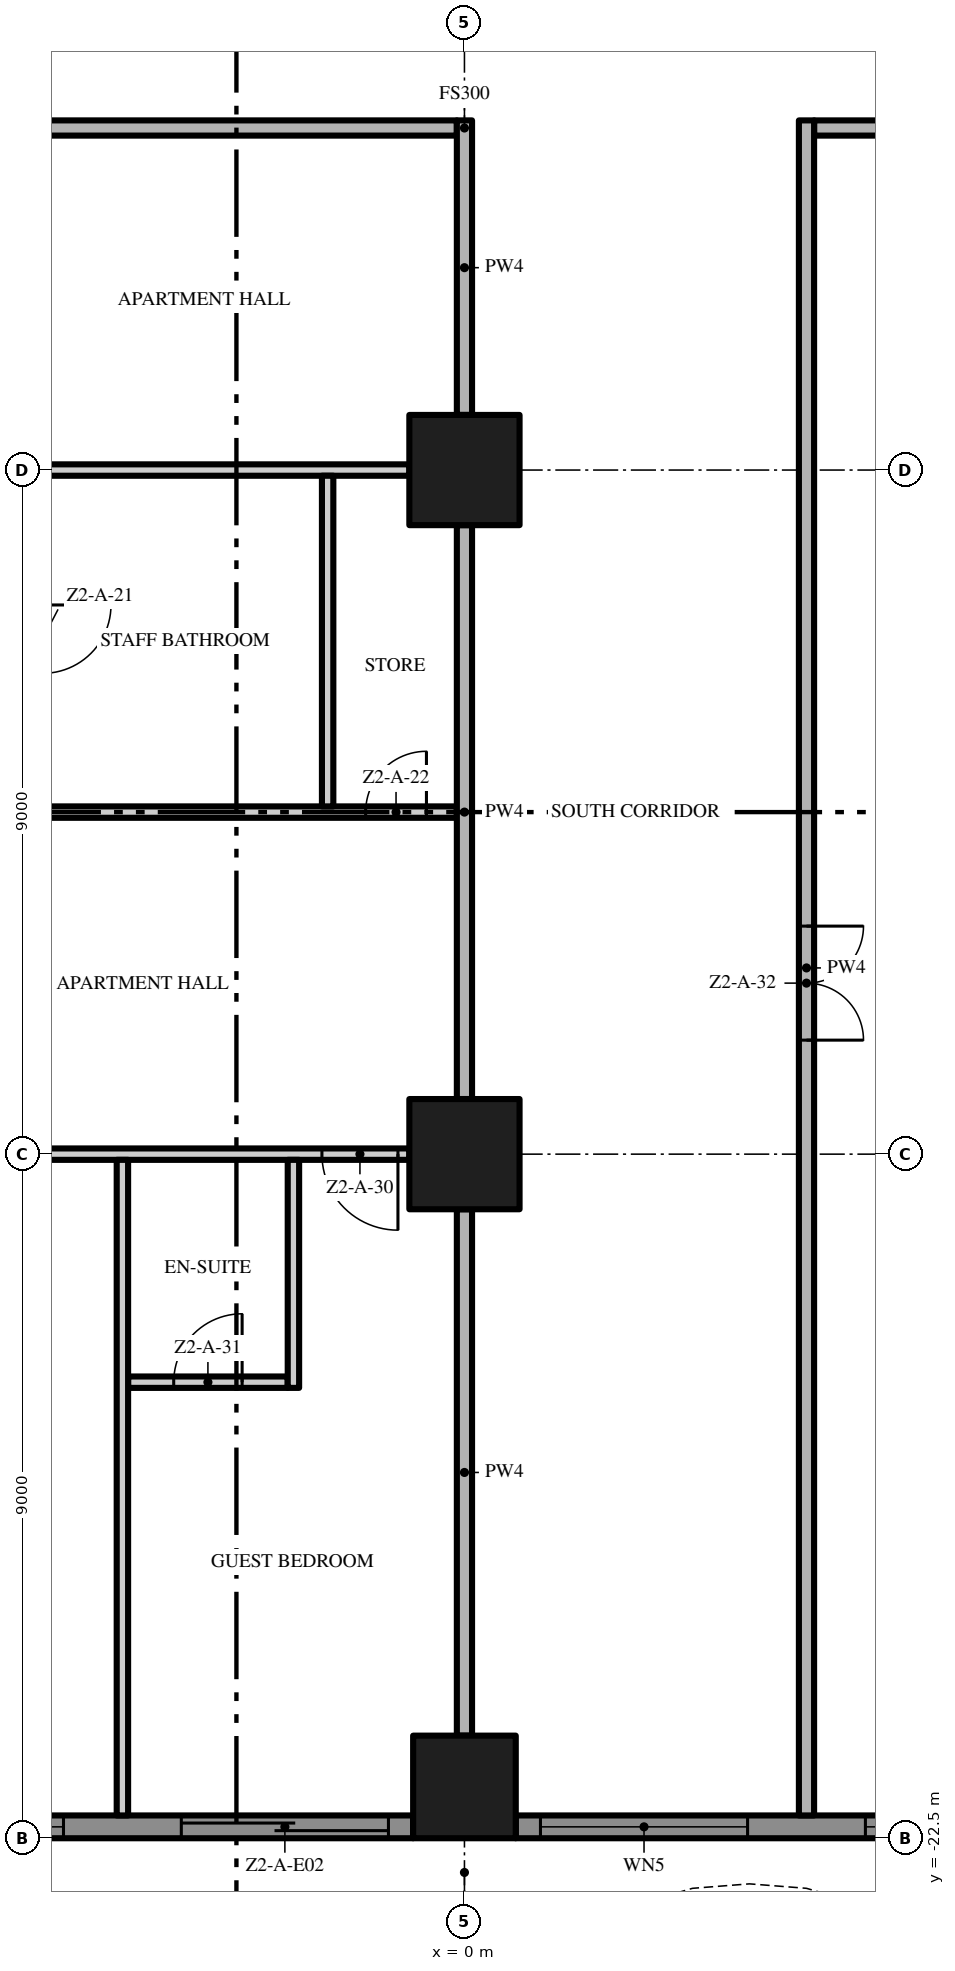
"""IFC4 building model, lengths in metres.
Left out: names, types, materials, properties, quantities, classifications, styles, units other than length and angle.
Written with IfcOpenShell. Run it as: python <this file> out.ifc"""

import sys

from ifc_helpers import new_model, si_unit, direction, frame, frame_2d, origin, origin_2d, place, context, subcontext, project, spatial, polyline, rectangle, outline, extrude, element, fill, save


model = new_model("IFC4")
c1 = context("Model", 3, precision=1e-05, world=origin(), true_north=direction((0.0, 1.0)))
c2 = subcontext(c1, "Body", "Model", "MODEL_VIEW")
j1 = project(units=[si_unit("LENGTHUNIT", "METRE"), si_unit("PLANEANGLEUNIT", "RADIAN")], contexts=[c1])
p1 = place(None, origin())
s1 = spatial("IfcSite", under=j1, at=p1, CompositionType="ELEMENT")
p2 = place(p1, origin())
s2 = spatial("IfcBuilding", under=s1, at=p2, CompositionType="ELEMENT")
p3 = place(p2, frame((0.0, 0.0, 77.0)))
s3 = spatial("IfcBuildingStorey", under=s2, at=p3, CompositionType="ELEMENT", Elevation=77.0)
p4 = place(p3, frame((0.0, -13.5, 0.0), z_axis=(0.0, 0.0, 1.0), x_axis=(1.0, 0.0, 0.0)))
e1 = element("IfcColumn", 1, at=p4, inside=s3, PredefinedType="COLUMN", context=c2, shape_type="SweptSolid", body=[
    extrude(rectangle(XDim=1.45, YDim=1.45, at=origin_2d()), origin(), (0.0, 0.0, 1.0), 3.5),
])
p5 = place(p3, frame((0.0, -21.825, 0.0), z_axis=(0.0, 0.0, 1.0), x_axis=(1.0, 0.0, 0.0)))
e2 = element("IfcColumn", 2, at=p5, inside=s3, PredefinedType="COLUMN", context=c2, shape_type="SweptSolid", body=[
    extrude(rectangle(XDim=1.35, YDim=1.35, at=origin_2d()), origin(), (0.0, 0.0, 1.0), 3.5),
])
p6 = place(p3, frame((0.0, -4.5, 0.0), z_axis=(0.0, 0.0, 1.0), x_axis=(1.0, 0.0, 0.0)))
e3 = element("IfcColumn", 3, at=p6, inside=s3, PredefinedType="COLUMN", context=c2, shape_type="SweptSolid", body=[
    extrude(rectangle(XDim=1.45, YDim=1.45, at=origin_2d()), origin(), (0.0, 0.0, 1.0), 3.5),
])
p7 = place(p3, frame((-0.675, -22.35, 0.0), z_axis=(0.0, 0.0, 1.0), x_axis=(-1.0, 0.0, 0.0)))
e4 = element("IfcWall", 4, at=p7, inside=s3, PredefinedType="SOLIDWALL", context=c2, shape_type="SweptSolid", body=[
    extrude(rectangle(XDim=7.65, YDim=0.3, at=frame_2d((3.825, 0.0))), origin(), (0.0, 0.0, 1.0), 3.5),
])
p8 = place(p7, frame((4.6, 0.0, 0.45)))
e5 = element("IfcOpeningElement", 5, at=p8, cuts=e4, PredefinedType="OPENING", context=c2, shape_type="SweptSolid", body=[
    extrude(rectangle(XDim=2.725, YDim=2.65, at=frame_2d((1.363, 1.325))), frame((0.0, 0.16, 0.0), z_axis=(0.0, -1.0, 0.0), x_axis=(1.0, 0.0, 0.0)), (0.0, 0.0, 1.0), 0.32),
])
p9 = place(p7, frame((0.325, 0.0, 0.0)))
e6 = element("IfcOpeningElement", 6, at=p9, cuts=e4, PredefinedType="OPENING", context=c2, shape_type="SweptSolid", body=[
    extrude(rectangle(XDim=2.725, YDim=2.4, at=frame_2d((1.363, 1.2))), frame((0.0, 0.16, 0.0), z_axis=(0.0, -1.0, 0.0), x_axis=(1.0, 0.0, 0.0)), (0.0, 0.0, 1.0), 0.32),
])
p10 = place(p3, frame((8.325, -22.35, 0.0), z_axis=(0.0, 0.0, 1.0), x_axis=(-1.0, 0.0, 0.0)))
e7 = element("IfcWall", 7, at=p10, inside=s3, PredefinedType="SOLIDWALL", context=c2, shape_type="SweptSolid", body=[
    extrude(rectangle(XDim=7.65, YDim=0.3, at=frame_2d((3.825, 0.0))), origin(), (0.0, 0.0, 1.0), 3.5),
])
p11 = place(p10, frame((4.6, 0.0, 0.45)))
e8 = element("IfcOpeningElement", 8, at=p11, cuts=e7, PredefinedType="OPENING", context=c2, shape_type="SweptSolid", body=[
    extrude(rectangle(XDim=2.725, YDim=2.65, at=frame_2d((1.363, 1.325))), frame((0.0, 0.16, 0.0), z_axis=(0.0, -1.0, 0.0), x_axis=(1.0, 0.0, 0.0)), (0.0, 0.0, 1.0), 0.32),
])
p12 = place(p10, frame((0.325, 0.0, 0.45)))
e9 = element("IfcOpeningElement", 9, at=p12, cuts=e7, PredefinedType="OPENING", context=c2, shape_type="SweptSolid", body=[
    extrude(rectangle(XDim=2.725, YDim=2.65, at=frame_2d((1.363, 1.325))), frame((0.0, 0.16, 0.0), z_axis=(0.0, -1.0, 0.0), x_axis=(1.0, 0.0, 0.0)), (0.0, 0.0, 1.0), 0.32),
])
p13 = place(p3, origin())
e10 = element("IfcWall", 10, at=p13, inside=s3, PredefinedType="USERDEFINED", context=c2, shape_type="SweptSolid", body=[
    extrude(outline(polyline([(-22.5, -24.3), (-21.0, -25.005), (-19.5, -25.441), (-18.75, -25.5), (-18.0, -25.441), (-16.5, -25.005), (-15.0, -24.3), (-13.5, -23.595), (-12.0, -23.159), (-11.25, -23.1), (-10.5, -23.159), (-9.0, -23.595), (-7.5, -24.3), (-6.0, -25.005), (-4.5, -25.441), (-3.75, -25.5), (-3.0, -25.441), (-1.5, -25.005), (0.0, -24.3), (1.5, -23.595), (3.0, -23.159), (3.75, -23.1), (4.5, -23.159), (6.0, -23.595), (7.5, -24.3), (9.0, -25.005), (10.5, -25.441), (11.25, -25.5), (12.0, -25.441), (13.5, -25.005), (15.0, -24.3), (16.5, -23.595), (18.0, -23.159), (18.75, -23.1), (19.5, -23.159), (21.0, -23.595), (22.5, -24.3), (22.606, -24.074), (21.089, -23.36), (19.545, -22.911), (18.75, -22.849), (17.955, -22.911), (16.411, -23.36), (14.894, -24.074), (13.411, -24.771), (11.955, -25.194), (11.25, -25.249), (10.545, -25.194), (9.089, -24.771), (7.606, -24.074), (6.089, -23.36), (4.545, -22.911), (3.75, -22.849), (2.955, -22.911), (1.411, -23.36), (-0.106, -24.074), (-1.589, -24.771), (-3.045, -25.194), (-3.75, -25.249), (-4.455, -25.194), (-5.911, -24.771), (-7.394, -24.074), (-8.911, -23.36), (-10.455, -22.911), (-11.25, -22.849), (-12.045, -22.911), (-13.589, -23.36), (-15.106, -24.074), (-16.589, -24.771), (-18.045, -25.194), (-18.75, -25.249), (-19.455, -25.194), (-20.911, -24.771), (-22.394, -24.074), (-22.5, -24.3)])), origin(), (0.0, 0.0, 1.0), 0.9),
])
p14 = place(p3, frame((-4.425, -16.5, 0.0), z_axis=(0.0, 0.0, 1.0), x_axis=(1.0, 0.0, 0.0)))
e11 = element("IfcWall", 11, at=p14, inside=s3, PredefinedType="PARTITIONING", context=c2, shape_type="SweptSolid", body=[
    extrude(rectangle(XDim=2.1, YDim=0.15, at=frame_2d((1.05, 0.0))), origin(), (0.0, 0.0, 1.0), 3.5),
])
p15 = place(p14, frame((0.6, 0.0, 0.0)))
e12 = element("IfcOpeningElement", 12, at=p15, cuts=e11, PredefinedType="OPENING", context=c2, shape_type="SweptSolid", body=[
    extrude(rectangle(XDim=0.9, YDim=2.1, at=frame_2d((0.45, 1.05))), frame((0.0, 0.085, 0.0), z_axis=(0.0, -1.0, 0.0), x_axis=(1.0, 0.0, 0.0)), (0.0, 0.0, 1.0), 0.17),
])
p16 = place(p3, frame((-0.725, -13.5, 0.0), z_axis=(0.0, 0.0, 1.0), x_axis=(-1.0, 0.0, 0.0)))
e13 = element("IfcWall", 13, at=p16, inside=s3, PredefinedType="PARTITIONING", context=c2, shape_type="SweptSolid", body=[
    extrude(rectangle(XDim=7.55, YDim=0.15, at=frame_2d((3.775, 0.0))), origin(), (0.0, 0.0, 1.0), 3.5),
])
p17 = place(p16, frame((5.3, 0.0, 0.0)))
e14 = element("IfcOpeningElement", 14, at=p17, cuts=e13, PredefinedType="OPENING", context=c2, shape_type="SweptSolid", body=[
    extrude(rectangle(XDim=1.5, YDim=2.4, at=frame_2d((0.75, 1.2))), frame((0.0, 0.085, 0.0), z_axis=(0.0, -1.0, 0.0), x_axis=(1.0, 0.0, 0.0)), (0.0, 0.0, 1.0), 0.17),
])
p18 = place(p16, frame((0.15, 0.0, 0.0)))
e15 = element("IfcOpeningElement", 15, at=p18, cuts=e13, PredefinedType="OPENING", context=c2, shape_type="SweptSolid", body=[
    extrude(rectangle(XDim=1.0, YDim=2.4, at=frame_2d((0.5, 1.2))), frame((0.0, 0.085, 0.0), z_axis=(0.0, -1.0, 0.0), x_axis=(1.0, 0.0, 0.0)), (0.0, 0.0, 1.0), 0.17),
])
p19 = place(p3, frame((-10.725, -9.0, 0.0), z_axis=(0.0, 0.0, 1.0), x_axis=(1.0, 0.0, 0.0)))
e16 = element("IfcWall", 16, at=p19, inside=s3, PredefinedType="PARTITIONING", context=c2, shape_type="SweptSolid", body=[
    extrude(rectangle(XDim=10.625, YDim=0.15, at=frame_2d((5.312, 0.0))), origin(), (0.0, 0.0, 1.0), 3.5),
])
p20 = place(p19, frame((2.1, 0.0, 0.0)))
e17 = element("IfcOpeningElement", 17, at=p20, cuts=e16, PredefinedType="OPENING", context=c2, shape_type="SweptSolid", body=[
    extrude(rectangle(XDim=0.9, YDim=2.1, at=frame_2d((0.45, 1.05))), frame((0.0, 0.085, 0.0), z_axis=(0.0, -1.0, 0.0), x_axis=(1.0, 0.0, 0.0)), (0.0, 0.0, 1.0), 0.17),
])
p21 = place(p19, frame((9.425, 0.0, 0.0)))
e18 = element("IfcOpeningElement", 18, at=p21, cuts=e16, PredefinedType="OPENING", context=c2, shape_type="SweptSolid", body=[
    extrude(rectangle(XDim=0.8, YDim=2.0, at=frame_2d((0.4, 1.0))), frame((0.0, 0.085, 0.0), z_axis=(0.0, -1.0, 0.0), x_axis=(1.0, 0.0, 0.0)), (0.0, 0.0, 1.0), 0.17),
])
p22 = place(p3, frame((-8.275, -4.5, 0.0), z_axis=(0.0, 0.0, 1.0), x_axis=(1.0, 0.0, 0.0)))
e19 = element("IfcWall", 19, at=p22, inside=s3, PredefinedType="PARTITIONING", context=c2, shape_type="SweptSolid", body=[
    extrude(rectangle(XDim=7.55, YDim=0.15, at=frame_2d((3.775, 0.0))), origin(), (0.0, 0.0, 1.0), 3.5),
])
p23 = place(p3, frame((-0.1, 0.0, 0.0), z_axis=(0.0, 0.0, 1.0), x_axis=(-1.0, 0.0, 0.0)))
e20 = element("IfcWall", 20, at=p23, inside=s3, PredefinedType="PARTITIONING", context=c2, shape_type="SweptSolid", body=[
    extrude(rectangle(XDim=17.3, YDim=0.2, at=frame_2d((8.65, 0.0))), origin(), (0.0, 0.0, 1.0), 3.5),
])
p24 = place(p23, frame((8.15, 0.0, 0.0)))
e21 = element("IfcOpeningElement", 21, at=p24, cuts=e20, PredefinedType="OPENING", context=c2, shape_type="SweptSolid", body=[
    extrude(rectangle(XDim=1.5, YDim=2.4, at=frame_2d((0.75, 1.2))), frame((0.0, 0.11, 0.0), z_axis=(0.0, -1.0, 0.0), x_axis=(1.0, 0.0, 0.0)), (0.0, 0.0, 1.0), 0.22),
])
p25 = place(p3, frame((4.6, 0.0, 0.0), z_axis=(0.0, 0.0, 1.0), x_axis=(1.0, 0.0, 0.0)))
e22 = element("IfcWall", 22, at=p25, inside=s3, PredefinedType="PARTITIONING", context=c2, shape_type="SweptSolid", body=[
    extrude(rectangle(XDim=12.8, YDim=0.2, at=frame_2d((6.4, 0.0))), origin(), (0.0, 0.0, 1.0), 3.5),
])
p26 = place(p3, frame((-4.5, -22.2, 0.0), z_axis=(0.0, 0.0, 1.0), x_axis=(0.0, 1.0, 0.0)))
e23 = element("IfcWall", 23, at=p26, inside=s3, PredefinedType="PARTITIONING", context=c2, shape_type="SweptSolid", body=[
    extrude(rectangle(XDim=8.625, YDim=0.15, at=frame_2d((4.312, 0.0))), origin(), (0.0, 0.0, 1.0), 3.5),
])
p27 = place(p3, frame((-2.25, -16.575, 0.0), z_axis=(0.0, 0.0, 1.0), x_axis=(0.0, 1.0, 0.0)))
e24 = element("IfcWall", 24, at=p27, inside=s3, PredefinedType="PARTITIONING", context=c2, shape_type="SweptSolid", body=[
    extrude(rectangle(XDim=3.0, YDim=0.15, at=frame_2d((1.5, 0.0))), origin(), (0.0, 0.0, 1.0), 3.5),
])
p28 = place(p3, frame((-1.8, -8.925, 0.0), z_axis=(0.0, 0.0, 1.0), x_axis=(0.0, 1.0, 0.0)))
e25 = element("IfcWall", 25, at=p28, inside=s3, PredefinedType="PARTITIONING", context=c2, shape_type="SweptSolid", body=[
    extrude(rectangle(XDim=4.35, YDim=0.15, at=frame_2d((2.175, 0.0))), origin(), (0.0, 0.0, 1.0), 3.5),
])
p29 = place(p3, frame((0.0, -21.15, 0.0), z_axis=(0.0, 0.0, 1.0), x_axis=(0.0, 1.0, 0.0)))
e26 = element("IfcWall", 26, at=p29, inside=s3, PredefinedType="PARTITIONING", context=c2, shape_type="SweptSolid", body=[
    extrude(rectangle(XDim=6.925, YDim=0.2, at=frame_2d((3.462, 0.0))), origin(), (0.0, 0.0, 1.0), 3.5),
])
p30 = place(p3, frame((0.0, -12.775, 0.0), z_axis=(0.0, 0.0, 1.0), x_axis=(0.0, 1.0, 0.0)))
e27 = element("IfcWall", 27, at=p30, inside=s3, PredefinedType="PARTITIONING", context=c2, shape_type="SweptSolid", body=[
    extrude(rectangle(XDim=7.55, YDim=0.2, at=frame_2d((3.775, 0.0))), origin(), (0.0, 0.0, 1.0), 3.5),
])
p31 = place(p3, frame((0.0, -3.775, 0.0), z_axis=(0.0, 0.0, 1.0), x_axis=(0.0, 1.0, 0.0)))
e28 = element("IfcWall", 28, at=p31, inside=s3, PredefinedType="PARTITIONING", context=c2, shape_type="SweptSolid", body=[
    extrude(rectangle(XDim=3.875, YDim=0.2, at=frame_2d((1.938, 0.0))), origin(), (0.0, 0.0, 1.0), 3.5),
])
p32 = place(p3, frame((4.5, 0.1, 0.0), z_axis=(0.0, 0.0, 1.0), x_axis=(0.0, -1.0, 0.0)))
e29 = element("IfcWall", 29, at=p32, inside=s3, PredefinedType="PARTITIONING", context=c2, shape_type="SweptSolid", body=[
    extrude(rectangle(XDim=22.3, YDim=0.2, at=frame_2d((11.15, 0.0))), origin(), (0.0, 0.0, 1.0), 3.5),
])
p33 = place(p32, frame((10.6, 0.0, 0.0)))
e30 = element("IfcOpeningElement", 30, at=p33, cuts=e29, PredefinedType="OPENING", context=c2, shape_type="SweptSolid", body=[
    extrude(rectangle(XDim=1.5, YDim=2.4, at=frame_2d((0.75, 1.2))), frame((0.0, 0.11, 0.0), z_axis=(0.0, -1.0, 0.0), x_axis=(1.0, 0.0, 0.0)), (0.0, 0.0, 1.0), 0.22),
])
p34 = place(p8, origin())
e31 = element("IfcWindow", 31, at=p34, inside=s3, PartitioningType="SINGLE_PANEL", PredefinedType="WINDOW", context=c2, shape_type="SweptSolid", body=[
    extrude(rectangle(XDim=2.725, YDim=2.65, at=frame_2d((1.363, 1.325))), frame((0.0, 0.03, 0.0), z_axis=(0.0, -1.0, 0.0), x_axis=(1.0, 0.0, 0.0)), (0.0, 0.0, 1.0), 0.06),
])
fill(e5, e31)
p35 = place(p9, origin())
e32 = element("IfcDoor", 32, at=p35, inside=s3, OperationType="SINGLE_SWING_LEFT", PredefinedType="DOOR", context=c2, shape_type="SweptSolid", body=[
    extrude(rectangle(XDim=2.725, YDim=2.4, at=frame_2d((1.363, 1.2))), frame((0.0, 0.025, 0.0), z_axis=(0.0, -1.0, 0.0), x_axis=(1.0, 0.0, 0.0)), (0.0, 0.0, 1.0), 0.05),
])
fill(e6, e32)
p36 = place(p11, origin())
e33 = element("IfcWindow", 33, at=p36, inside=s3, PartitioningType="SINGLE_PANEL", PredefinedType="WINDOW", context=c2, shape_type="SweptSolid", body=[
    extrude(rectangle(XDim=2.725, YDim=2.65, at=frame_2d((1.363, 1.325))), frame((0.0, 0.03, 0.0), z_axis=(0.0, -1.0, 0.0), x_axis=(1.0, 0.0, 0.0)), (0.0, 0.0, 1.0), 0.06),
])
fill(e8, e33)
p37 = place(p12, origin())
e34 = element("IfcWindow", 34, at=p37, inside=s3, PartitioningType="SINGLE_PANEL", PredefinedType="WINDOW", context=c2, shape_type="SweptSolid", body=[
    extrude(rectangle(XDim=2.725, YDim=2.65, at=frame_2d((1.363, 1.325))), frame((0.0, 0.03, 0.0), z_axis=(0.0, -1.0, 0.0), x_axis=(1.0, 0.0, 0.0)), (0.0, 0.0, 1.0), 0.06),
])
fill(e9, e34)
p38 = place(p21, origin())
e35 = element("IfcDoor", 35, at=p38, inside=s3, OperationType="SINGLE_SWING_RIGHT", PredefinedType="DOOR", context=c2, shape_type="SweptSolid", body=[
    extrude(rectangle(XDim=0.8, YDim=2.0, at=frame_2d((0.4, 1.0))), frame((0.0, 0.025, 0.0), z_axis=(0.0, -1.0, 0.0), x_axis=(1.0, 0.0, 0.0)), (0.0, 0.0, 1.0), 0.05),
])
fill(e18, e35)
p39 = place(p18, origin())
e36 = element("IfcDoor", 36, at=p39, inside=s3, OperationType="SINGLE_SWING_LEFT", PredefinedType="DOOR", context=c2, shape_type="SweptSolid", body=[
    extrude(rectangle(XDim=1.0, YDim=2.4, at=frame_2d((0.5, 1.2))), frame((0.0, 0.025, 0.0), z_axis=(0.0, -1.0, 0.0), x_axis=(1.0, 0.0, 0.0)), (0.0, 0.0, 1.0), 0.05),
])
fill(e15, e36)
p40 = place(p15, origin())
e37 = element("IfcDoor", 37, at=p40, inside=s3, OperationType="SINGLE_SWING_RIGHT", PredefinedType="DOOR", context=c2, shape_type="SweptSolid", body=[
    extrude(rectangle(XDim=0.9, YDim=2.1, at=frame_2d((0.45, 1.05))), frame((0.0, 0.025, 0.0), z_axis=(0.0, -1.0, 0.0), x_axis=(1.0, 0.0, 0.0)), (0.0, 0.0, 1.0), 0.05),
])
fill(e12, e37)
p41 = place(p33, origin())
e38 = element("IfcDoor", 38, at=p41, inside=s3, OperationType="DOUBLE_DOOR_SINGLE_SWING", PredefinedType="DOOR", context=c2, shape_type="SweptSolid", body=[
    extrude(rectangle(XDim=1.5, YDim=2.4, at=frame_2d((0.75, 1.2))), frame((0.0, 0.025, 0.0), z_axis=(0.0, -1.0, 0.0), x_axis=(1.0, 0.0, 0.0)), (0.0, 0.0, 1.0), 0.05),
])
fill(e30, e38)
save(model, sys.argv[1])
